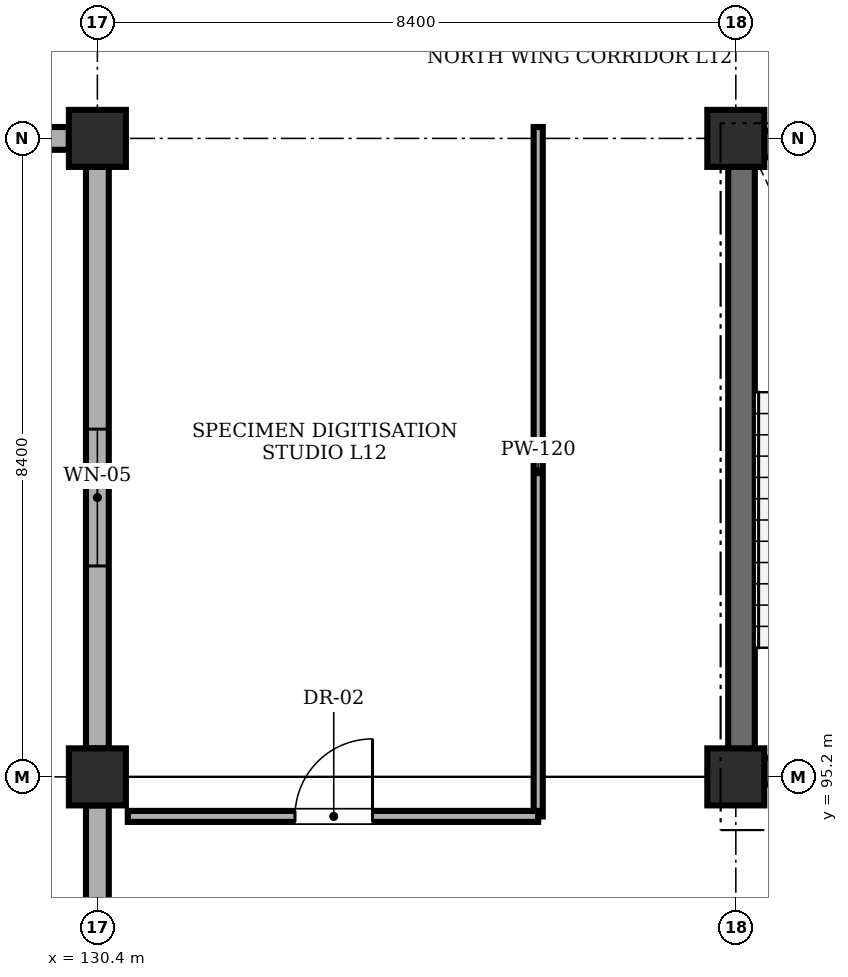
"""IFC4 building model, lengths in metres.
Left out: names, types, materials, properties, quantities, classifications, styles, units other than length and angle.
Written with IfcOpenShell. Run it as: python <this file> out.ifc"""

import sys

from ifc_helpers import new_model, si_unit, direction, frame, frame_2d, origin, origin_2d, place, context, subcontext, project, spatial, rectangle, extrude, element, fill, save


model = new_model("IFC4")
c1 = context("Model", 3, precision=1e-05, world=origin(), true_north=direction((0.0, 1.0)))
c2 = subcontext(c1, "Body", "Model", "MODEL_VIEW")
j1 = project(units=[si_unit("LENGTHUNIT", "METRE"), si_unit("PLANEANGLEUNIT", "RADIAN")], contexts=[c1])
p1 = place(None, origin())
s1 = spatial("IfcSite", under=j1, at=p1, CompositionType="ELEMENT")
p2 = place(p1, origin())
s2 = spatial("IfcBuilding", under=s1, at=p2, CompositionType="ELEMENT")
p3 = place(p2, frame((0.0, 0.0, 48.6)))
s3 = spatial("IfcBuildingStorey", under=s2, at=p3, CompositionType="ELEMENT", Elevation=48.6)
for number, where, z_axis, x_axis in (
    (1, (130.4, 95.2, 0.0), (0.0, 0.0, 1.0), (1.0, 0.0, 0.0)),
    (2, (130.4, 103.6, 0.0), (0.0, 0.0, 1.0), (1.0, 0.0, 0.0)),
    (3, (138.8, 95.2, 0.0), (0.0, 0.0, 1.0), (1.0, 0.0, 0.0)),
    (4, (138.8, 103.6, 0.0), (0.0, 0.0, 1.0), (1.0, 0.0, 0.0)),
):
    element("IfcColumn", number, at=place(p3, frame(where, z_axis=z_axis, x_axis=x_axis)), inside=s3, PredefinedType="COLUMN", context=c2, shape_type="SweptSolid", body=[
        extrude(rectangle(XDim=0.75, YDim=0.75, at=origin_2d()), origin(), (0.0, 0.0, 1.0), 4.03),
    ])
for number, where, z_axis, x_axis in (
    (5, (138.7, 95.275, 0.0), (0.0, 0.0, 1.0), (1.0, 0.0, 0.0)),
    (6, (138.7, 103.525, 0.0), (0.0, 0.0, 1.0), (1.0, 0.0, 0.0)),
):
    element("IfcWall", number, at=place(p3, frame(where, z_axis=z_axis, x_axis=x_axis)), inside=s3, PredefinedType="SHEAR", context=c2, shape_type="SweptSolid", body=[
        extrude(rectangle(XDim=3.8, YDim=0.35, at=frame_2d((1.9, 0.0))), origin(), (0.0, 0.0, 1.0), 4.03),
    ])
p4 = place(p3, frame((138.875, 95.45, 0.0), z_axis=(0.0, 0.0, 1.0), x_axis=(0.0, 1.0, 0.0)))
e7 = element("IfcWall", 7, at=p4, inside=s3, PredefinedType="SHEAR", context=c2, shape_type="SweptSolid", body=[
    extrude(rectangle(XDim=7.9, YDim=0.35, at=frame_2d((3.95, 0.0))), origin(), (0.0, 0.0, 1.0), 4.03),
])
p5 = place(p3, frame((130.4, 92.15, 0.0), z_axis=(0.0, 0.0, 1.0), x_axis=(0.0, 1.0, 0.0)))
e8 = element("IfcWall", 8, at=p5, inside=s3, PredefinedType="STANDARD", context=c2, shape_type="SweptSolid", body=[
    extrude(rectangle(XDim=2.675, YDim=0.3, at=frame_2d((1.337, 0.0))), origin(), (0.0, 0.0, 1.0), 4.03),
])
p6 = place(p3, frame((130.4, 95.575, 0.0), z_axis=(0.0, 0.0, 1.0), x_axis=(0.0, 1.0, 0.0)))
e9 = element("IfcWall", 9, at=p6, inside=s3, PredefinedType="STANDARD", context=c2, shape_type="SweptSolid", body=[
    extrude(rectangle(XDim=7.65, YDim=0.3, at=frame_2d((3.825, 0.0))), origin(), (0.0, 0.0, 1.0), 3.33),
])
p7 = place(p6, frame((2.4, 0.0, 1.0)))
e10 = element("IfcOpeningElement", 10, at=p7, cuts=e9, PredefinedType="OPENING", context=c2, shape_type="SweptSolid", body=[
    extrude(rectangle(XDim=1.8, YDim=1.8, at=frame_2d((0.9, 0.9))), frame((0.0, 0.16, 0.0), z_axis=(0.0, -1.0, 0.0), x_axis=(1.0, 0.0, 0.0)), (0.0, 0.0, 1.0), 0.32),
])
p8 = place(p3, frame((130.025, 103.6, 0.0), z_axis=(0.0, 0.0, 1.0), x_axis=(-1.0, 0.0, 0.0)))
e11 = element("IfcWall", 11, at=p8, inside=s3, PredefinedType="STANDARD", context=c2, shape_type="SweptSolid", body=[
    extrude(rectangle(XDim=7.65, YDim=0.3, at=frame_2d((3.825, 0.0))), origin(), (0.0, 0.0, 1.0), 3.33),
])
p9 = place(p3, frame((136.2, 94.68, 0.0), z_axis=(0.0, 0.0, 1.0), x_axis=(0.0, 1.0, 0.0)))
e12 = element("IfcWall", 12, at=p9, inside=s3, PredefinedType="PARTITIONING", context=c2, shape_type="SweptSolid", body=[
    extrude(rectangle(XDim=9.07, YDim=0.12, at=frame_2d((4.535, 0.0))), origin(), (0.0, 0.0, 1.0), 4.03),
])
p10 = place(p3, frame((130.8, 94.68, 0.0), z_axis=(0.0, 0.0, 1.0), x_axis=(1.0, 0.0, 0.0)))
e13 = element("IfcWall", 13, at=p10, inside=s3, PredefinedType="PARTITIONING", context=c2, shape_type="SweptSolid", body=[
    extrude(rectangle(XDim=5.4, YDim=0.145, at=frame_2d((2.7, 0.0))), origin(), (0.0, 0.0, 1.0), 4.03),
])
p11 = place(p10, frame((2.2, 0.0, 0.0)))
e14 = element("IfcOpeningElement", 14, at=p11, cuts=e13, PredefinedType="OPENING", context=c2, shape_type="SweptSolid", body=[
    extrude(rectangle(XDim=1.02, YDim=2.15, at=frame_2d((0.51, 1.075))), frame((0.0, 0.083, 0.0), z_axis=(0.0, -1.0, 0.0), x_axis=(1.0, 0.0, 0.0)), (0.0, 0.0, 1.0), 0.165),
])
p12 = place(p7, origin())
e15 = element("IfcWindow", 15, at=p12, inside=s3, PartitioningType="DOUBLE_PANEL_VERTICAL", PredefinedType="WINDOW", context=c2, shape_type="SweptSolid", body=[
    extrude(rectangle(XDim=1.8, YDim=1.8, at=frame_2d((0.9, 0.9))), frame((0.0, 0.03, 0.0), z_axis=(0.0, -1.0, 0.0), x_axis=(1.0, 0.0, 0.0)), (0.0, 0.0, 1.0), 0.06),
])
fill(e10, e15)
p13 = place(p11, origin())
e16 = element("IfcDoor", 16, at=p13, inside=s3, OperationType="SINGLE_SWING_RIGHT", PredefinedType="DOOR", context=c2, shape_type="SweptSolid", body=[
    extrude(rectangle(XDim=1.02, YDim=2.15, at=frame_2d((0.51, 1.075))), frame((0.0, 0.025, 0.0), z_axis=(0.0, -1.0, 0.0), x_axis=(1.0, 0.0, 0.0)), (0.0, 0.0, 1.0), 0.05),
])
fill(e14, e16)
save(model, sys.argv[1])
